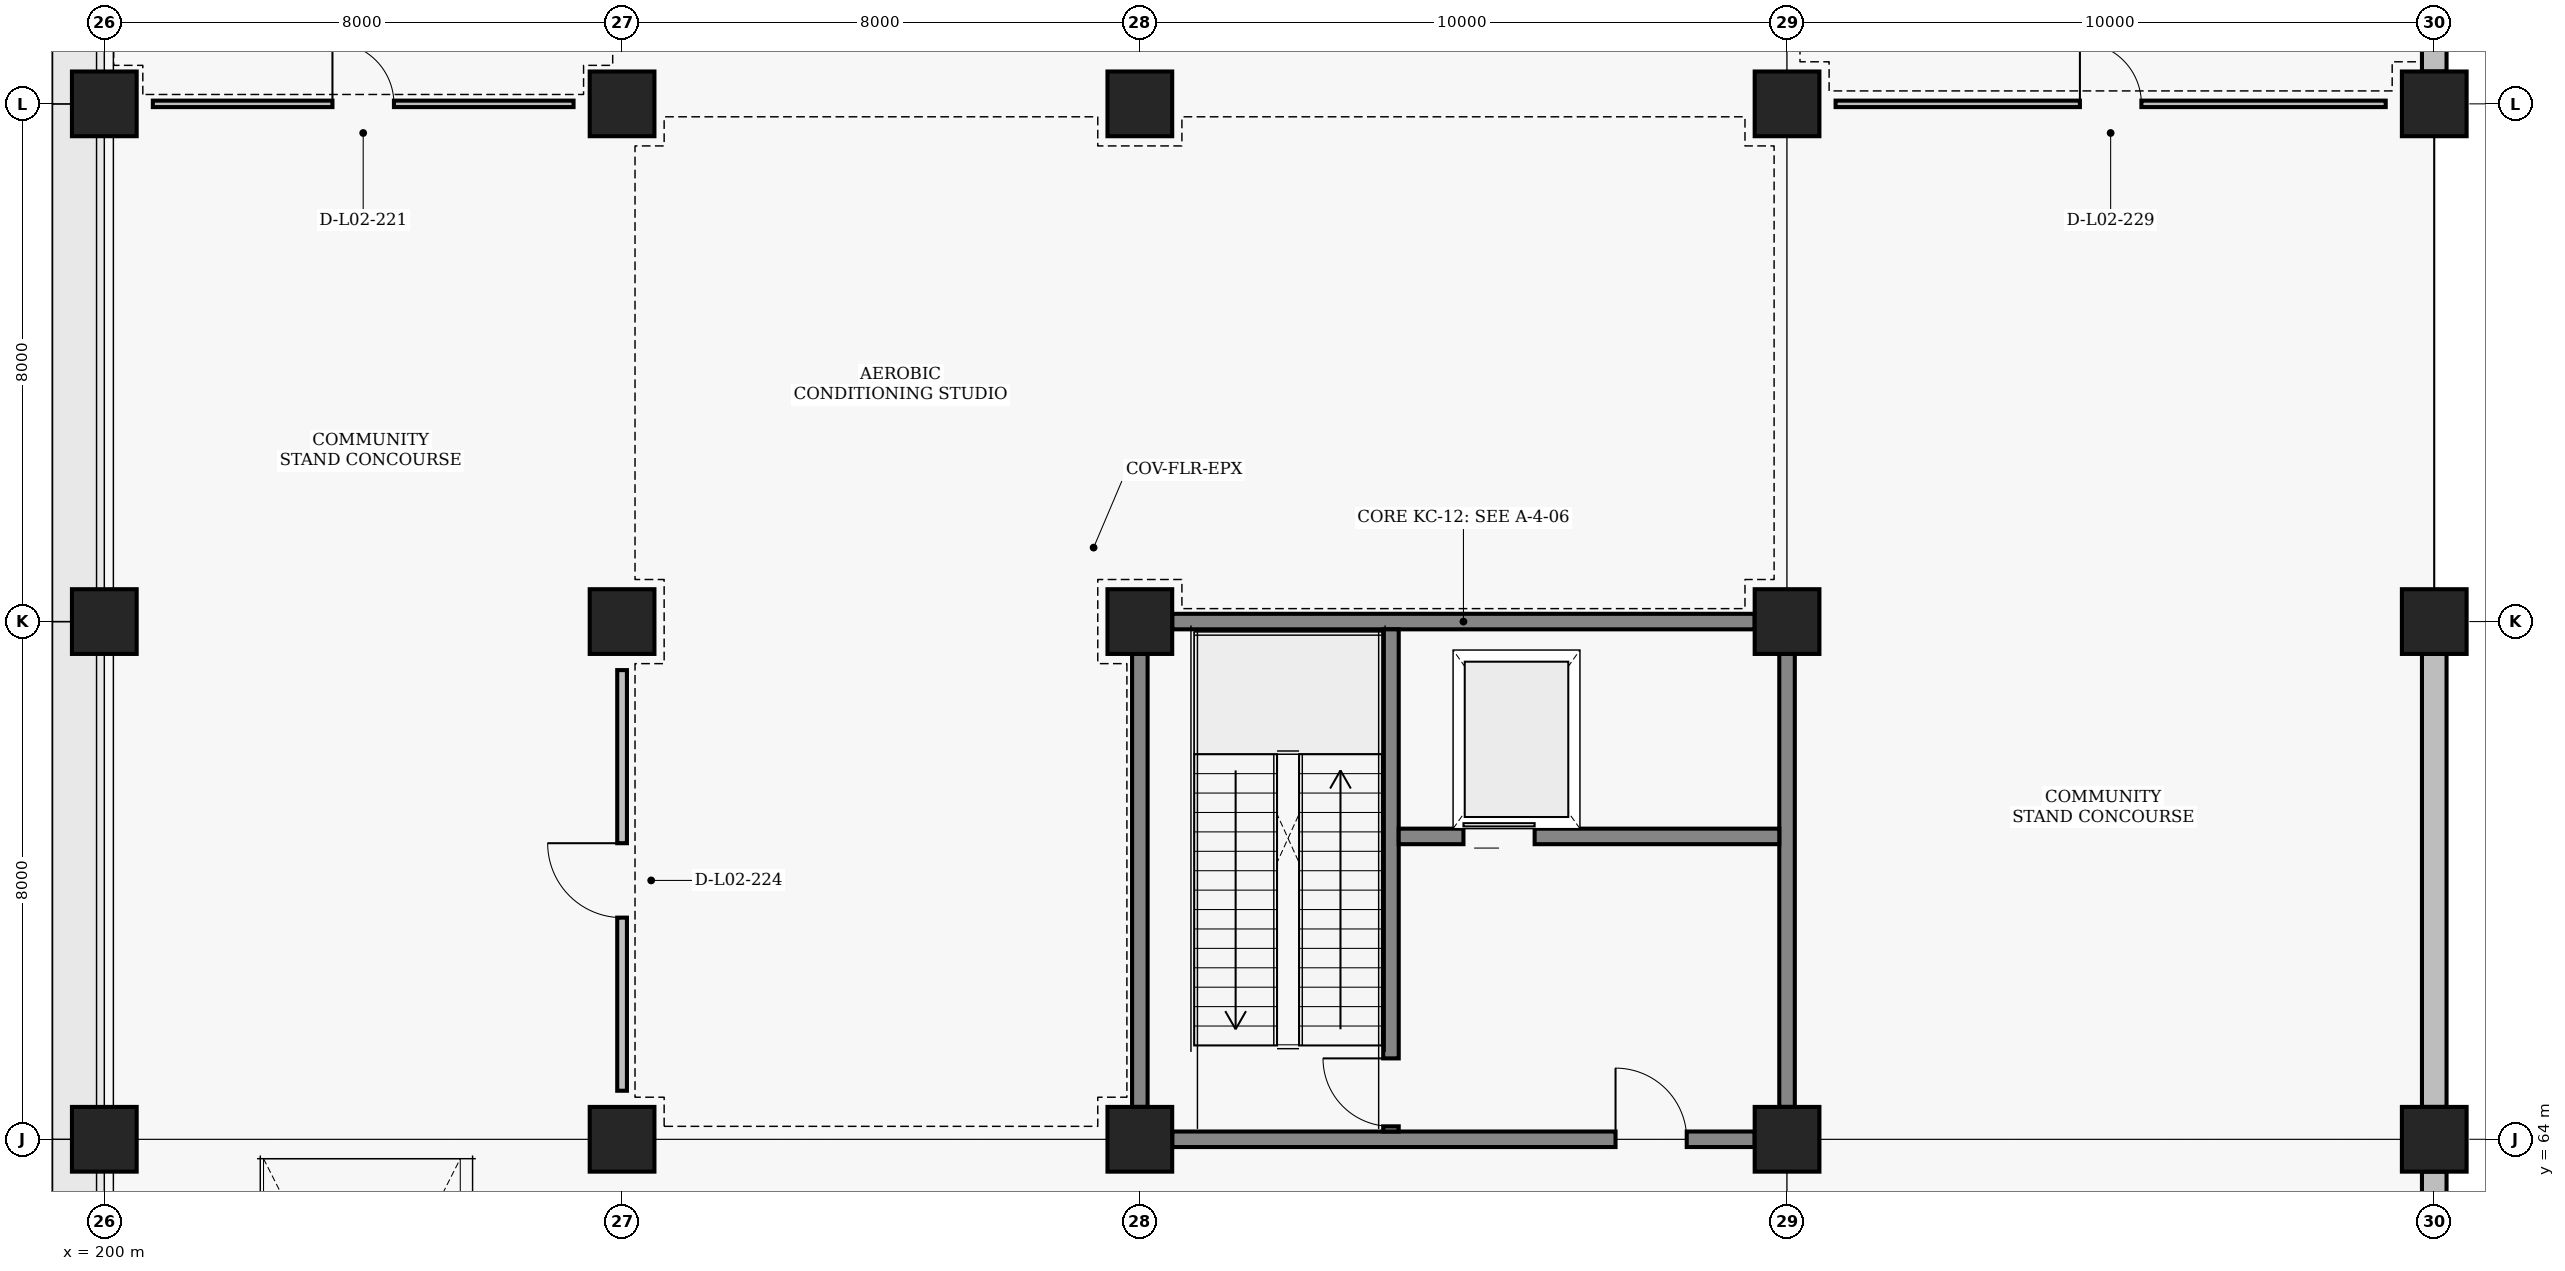
"""IFC4 building model, lengths in metres.
Left out: names, types, materials, properties, quantities, classifications, styles, units other than length and angle.
Written with IfcOpenShell. Run it as: python <this file> out.ifc"""

import sys

from ifc_helpers import new_model, si_unit, direction, frame, frame_2d, origin, origin_2d, place, context, subcontext, project, spatial, rectangle, extrude, element, fill, save


model = new_model("IFC4")
c1 = context("Model", 3, precision=1e-05, world=origin(), true_north=direction((0.0, 1.0)))
c2 = subcontext(c1, "Body", "Model", "MODEL_VIEW")
j1 = project(units=[si_unit("LENGTHUNIT", "METRE"), si_unit("PLANEANGLEUNIT", "RADIAN")], contexts=[c1])
p1 = place(None, origin())
s1 = spatial("IfcSite", under=j1, at=p1, CompositionType="ELEMENT")
p2 = place(p1, origin())
s2 = spatial("IfcBuilding", under=s1, at=p2, CompositionType="ELEMENT")
p3 = place(p2, frame((0.0, 0.0, 4.8)))
s3 = spatial("IfcBuildingStorey", under=s2, at=p3, CompositionType="ELEMENT", Elevation=4.8)
for number, where, z_axis, x_axis in (
    (1, (200.0, 64.0, 0.0), (0.0, 0.0, 1.0), (1.0, 0.0, 0.0)),
    (2, (200.0, 72.0, 0.0), (0.0, 0.0, 1.0), (1.0, 0.0, 0.0)),
    (3, (200.0, 80.0, 0.0), (0.0, 0.0, 1.0), (1.0, 0.0, 0.0)),
    (4, (208.0, 64.0, 0.0), (0.0, 0.0, 1.0), (1.0, 0.0, 0.0)),
    (5, (208.0, 72.0, 0.0), (0.0, 0.0, 1.0), (1.0, 0.0, 0.0)),
    (6, (208.0, 80.0, 0.0), (0.0, 0.0, 1.0), (1.0, 0.0, 0.0)),
    (7, (216.0, 64.0, 0.0), (0.0, 0.0, 1.0), (1.0, 0.0, 0.0)),
    (8, (216.0, 72.0, 0.0), (0.0, 0.0, 1.0), (1.0, 0.0, 0.0)),
    (9, (216.0, 80.0, 0.0), (0.0, 0.0, 1.0), (1.0, 0.0, 0.0)),
    (10, (226.0, 64.0, 0.0), (0.0, 0.0, 1.0), (1.0, 0.0, 0.0)),
    (11, (226.0, 72.0, 0.0), (0.0, 0.0, 1.0), (1.0, 0.0, 0.0)),
    (12, (226.0, 80.0, 0.0), (0.0, 0.0, 1.0), (1.0, 0.0, 0.0)),
    (13, (236.0, 64.0, 0.0), (0.0, 0.0, 1.0), (1.0, 0.0, 0.0)),
    (14, (236.0, 72.0, 0.0), (0.0, 0.0, 1.0), (1.0, 0.0, 0.0)),
    (15, (236.0, 80.0, 0.0), (0.0, 0.0, 1.0), (1.0, 0.0, 0.0)),
):
    element("IfcColumn", number, at=place(p3, frame(where, z_axis=z_axis, x_axis=x_axis)), inside=s3, PredefinedType="COLUMN", context=c2, shape_type="SweptSolid", body=[
        extrude(rectangle(XDim=1.0, YDim=1.0, at=origin_2d()), origin(), (0.0, 0.0, 1.0), 4.8),
    ])
for number, where, z_axis, x_axis in (
    (16, (236.0, 56.5, 0.0), (0.0, 0.0, 1.0), (0.0, 1.0, 0.0)),
    (17, (236.0, 64.5, 0.0), (0.0, 0.0, 1.0), (0.0, 1.0, 0.0)),
    (18, (236.0, 80.5, 0.0), (0.0, 0.0, 1.0), (0.0, 1.0, 0.0)),
):
    element("IfcWall", number, at=place(p3, frame(where, z_axis=z_axis, x_axis=x_axis)), inside=s3, PredefinedType="SOLIDWALL", context=c2, shape_type="SweptSolid", body=[
        extrude(rectangle(XDim=7.0, YDim=0.38, at=frame_2d((3.5, 0.0))), origin(), (0.0, 0.0, 1.0), 3.81),
    ])
p4 = place(p3, frame((216.5, 64.0, 0.0), z_axis=(0.0, 0.0, 1.0), x_axis=(1.0, 0.0, 0.0)))
e19 = element("IfcWall", 19, at=p4, inside=s3, PredefinedType="SHEAR", context=c2, shape_type="SweptSolid", body=[
    extrude(rectangle(XDim=9.0, YDim=0.24, at=frame_2d((4.5, 0.0))), origin(), (0.0, 0.0, 1.0), 3.81),
])
p5 = place(p4, frame((6.85, 0.0, 0.0)))
e20 = element("IfcOpeningElement", 20, at=p5, cuts=e19, PredefinedType="OPENING", context=c2, shape_type="SweptSolid", body=[
    extrude(rectangle(XDim=1.1, YDim=2.2, at=frame_2d((0.55, 1.1))), frame((0.0, 0.13, 0.0), z_axis=(0.0, -1.0, 0.0), x_axis=(1.0, 0.0, 0.0)), (0.0, 0.0, 1.0), 0.26),
])
p6 = place(p3, frame((216.5, 72.0, 0.0), z_axis=(0.0, 0.0, 1.0), x_axis=(1.0, 0.0, 0.0)))
e21 = element("IfcWall", 21, at=p6, inside=s3, PredefinedType="SHEAR", context=c2, shape_type="SweptSolid", body=[
    extrude(rectangle(XDim=9.0, YDim=0.24, at=frame_2d((4.5, 0.0))), origin(), (0.0, 0.0, 1.0), 3.81),
])
p7 = place(p3, frame((216.0, 64.5, 0.0), z_axis=(0.0, 0.0, 1.0), x_axis=(0.0, 1.0, 0.0)))
e22 = element("IfcWall", 22, at=p7, inside=s3, PredefinedType="SHEAR", context=c2, shape_type="SweptSolid", body=[
    extrude(rectangle(XDim=7.0, YDim=0.24, at=frame_2d((3.5, 0.0))), origin(), (0.0, 0.0, 1.0), 3.91),
])
p8 = place(p3, frame((226.0, 64.5, 0.0), z_axis=(0.0, 0.0, 1.0), x_axis=(0.0, 1.0, 0.0)))
e23 = element("IfcWall", 23, at=p8, inside=s3, PredefinedType="SHEAR", context=c2, shape_type="SweptSolid", body=[
    extrude(rectangle(XDim=7.0, YDim=0.24, at=frame_2d((3.5, 0.0))), origin(), (0.0, 0.0, 1.0), 3.81),
])
p9 = place(p3, frame((219.88, 64.12, 0.0), z_axis=(0.0, 0.0, 1.0), x_axis=(0.0, 1.0, 0.0)))
e24 = element("IfcWall", 24, at=p9, inside=s3, PredefinedType="SHEAR", context=c2, shape_type="SweptSolid", body=[
    extrude(rectangle(XDim=7.76, YDim=0.24, at=frame_2d((3.88, 0.0))), origin(), (0.0, 0.0, 1.0), 4.01),
])
p10 = place(p9, frame((0.08, 0.0, 0.0)))
e25 = element("IfcOpeningElement", 25, at=p10, cuts=e24, PredefinedType="OPENING", context=c2, shape_type="SweptSolid", body=[
    extrude(rectangle(XDim=1.05, YDim=2.15, at=frame_2d((0.525, 1.075))), frame((0.0, 0.13, 0.0), z_axis=(0.0, -1.0, 0.0), x_axis=(1.0, 0.0, 0.0)), (0.0, 0.0, 1.0), 0.26),
])
p11 = place(p3, frame((220.0, 68.68, 0.0), z_axis=(0.0, 0.0, 1.0), x_axis=(1.0, 0.0, 0.0)))
e26 = element("IfcWall", 26, at=p11, inside=s3, PredefinedType="SHEAR", context=c2, shape_type="SweptSolid", body=[
    extrude(rectangle(XDim=5.88, YDim=0.24, at=frame_2d((2.94, 0.0))), origin(), (0.0, 0.0, 1.0), 3.91),
])
p12 = place(p11, frame((1.0, 0.0, 0.0)))
e27 = element("IfcOpeningElement", 27, at=p12, cuts=e26, PredefinedType="OPENING", context=c2, shape_type="SweptSolid", body=[
    extrude(rectangle(XDim=1.1, YDim=2.15, at=frame_2d((0.55, 1.075))), frame((0.0, 0.13, 0.0), z_axis=(0.0, -1.0, 0.0), x_axis=(1.0, 0.0, 0.0)), (0.0, 0.0, 1.0), 0.26),
])
p13 = place(p3, frame((200.75, 80.0, 0.0), z_axis=(0.0, 0.0, 1.0), x_axis=(1.0, 0.0, 0.0)))
e28 = element("IfcWall", 28, at=p13, inside=s3, PredefinedType="PARTITIONING", context=c2, shape_type="SweptSolid", body=[
    extrude(rectangle(XDim=6.5, YDim=0.1, at=frame_2d((3.25, 0.0))), origin(), (0.0, 0.0, 1.0), 3.91),
])
p14 = place(p13, frame((2.775, 0.0, 0.0)))
e29 = element("IfcOpeningElement", 29, at=p14, cuts=e28, PredefinedType="OPENING", context=c2, shape_type="SweptSolid", body=[
    extrude(rectangle(XDim=0.95, YDim=2.1, at=frame_2d((0.475, 1.05))), frame((0.0, 0.06, 0.0), z_axis=(0.0, -1.0, 0.0), x_axis=(1.0, 0.0, 0.0)), (0.0, 0.0, 1.0), 0.12),
])
p15 = place(p3, frame((208.0, 64.75, 0.0), z_axis=(0.0, 0.0, 1.0), x_axis=(0.0, 1.0, 0.0)))
e30 = element("IfcWall", 30, at=p15, inside=s3, PredefinedType="PARTITIONING", context=c2, shape_type="SweptSolid", body=[
    extrude(rectangle(XDim=6.5, YDim=0.15, at=frame_2d((3.25, 0.0))), origin(), (0.0, 0.0, 1.0), 3.91),
])
p16 = place(p15, frame((2.675, 0.0, 0.0)))
e31 = element("IfcOpeningElement", 31, at=p16, cuts=e30, PredefinedType="OPENING", context=c2, shape_type="SweptSolid", body=[
    extrude(rectangle(XDim=1.15, YDim=2.15, at=frame_2d((0.575, 1.075))), frame((0.0, 0.085, 0.0), z_axis=(0.0, -1.0, 0.0), x_axis=(1.0, 0.0, 0.0)), (0.0, 0.0, 1.0), 0.17),
])
p17 = place(p3, frame((226.75, 80.0, 0.0), z_axis=(0.0, 0.0, 1.0), x_axis=(1.0, 0.0, 0.0)))
e32 = element("IfcWall", 32, at=p17, inside=s3, PredefinedType="PARTITIONING", context=c2, shape_type="SweptSolid", body=[
    extrude(rectangle(XDim=8.5, YDim=0.1, at=frame_2d((4.25, 0.0))), origin(), (0.0, 0.0, 1.0), 3.81),
])
p18 = place(p17, frame((3.775, 0.0, 0.0)))
e33 = element("IfcOpeningElement", 33, at=p18, cuts=e32, PredefinedType="OPENING", context=c2, shape_type="SweptSolid", body=[
    extrude(rectangle(XDim=0.95, YDim=2.1, at=frame_2d((0.475, 1.05))), frame((0.0, 0.06, 0.0), z_axis=(0.0, -1.0, 0.0), x_axis=(1.0, 0.0, 0.0)), (0.0, 0.0, 1.0), 0.12),
])
p19 = place(p5, origin())
e34 = element("IfcDoor", 34, at=p19, inside=s3, OperationType="SINGLE_SWING_LEFT", PredefinedType="DOOR", context=c2, shape_type="SweptSolid", body=[
    extrude(rectangle(XDim=1.1, YDim=2.2, at=frame_2d((0.55, 1.1))), frame((0.0, 0.025, 0.0), z_axis=(0.0, -1.0, 0.0), x_axis=(1.0, 0.0, 0.0)), (0.0, 0.0, 1.0), 0.05),
])
fill(e20, e34)
p20 = place(p10, origin())
e35 = element("IfcDoor", 35, at=p20, inside=s3, OperationType="SINGLE_SWING_RIGHT", PredefinedType="DOOR", context=c2, shape_type="SweptSolid", body=[
    extrude(rectangle(XDim=1.05, YDim=2.15, at=frame_2d((0.525, 1.075))), frame((0.0, 0.025, 0.0), z_axis=(0.0, -1.0, 0.0), x_axis=(1.0, 0.0, 0.0)), (0.0, 0.0, 1.0), 0.05),
])
fill(e25, e35)
p21 = place(p12, origin())
e36 = element("IfcDoor", 36, at=p21, inside=s3, OperationType="SLIDING_TO_LEFT", PredefinedType="DOOR", context=c2, shape_type="SweptSolid", body=[
    extrude(rectangle(XDim=1.1, YDim=2.15, at=frame_2d((0.55, 1.075))), frame((0.0, 0.025, 0.0), z_axis=(0.0, -1.0, 0.0), x_axis=(1.0, 0.0, 0.0)), (0.0, 0.0, 1.0), 0.05),
])
fill(e27, e36)
p22 = place(p14, origin())
e37 = element("IfcDoor", 37, at=p22, inside=s3, OperationType="SINGLE_SWING_LEFT", PredefinedType="DOOR", context=c2, shape_type="SweptSolid", body=[
    extrude(rectangle(XDim=0.95, YDim=2.1, at=frame_2d((0.475, 1.05))), frame((0.0, 0.025, 0.0), z_axis=(0.0, -1.0, 0.0), x_axis=(1.0, 0.0, 0.0)), (0.0, 0.0, 1.0), 0.05),
])
fill(e29, e37)
p23 = place(p16, origin())
e38 = element("IfcDoor", 38, at=p23, inside=s3, OperationType="SINGLE_SWING_RIGHT", PredefinedType="DOOR", context=c2, shape_type="SweptSolid", body=[
    extrude(rectangle(XDim=1.15, YDim=2.15, at=frame_2d((0.575, 1.075))), frame((0.0, 0.025, 0.0), z_axis=(0.0, -1.0, 0.0), x_axis=(1.0, 0.0, 0.0)), (0.0, 0.0, 1.0), 0.05),
])
fill(e31, e38)
p24 = place(p18, origin())
e39 = element("IfcDoor", 39, at=p24, inside=s3, OperationType="SINGLE_SWING_LEFT", PredefinedType="DOOR", context=c2, shape_type="SweptSolid", body=[
    extrude(rectangle(XDim=0.95, YDim=2.1, at=frame_2d((0.475, 1.05))), frame((0.0, 0.025, 0.0), z_axis=(0.0, -1.0, 0.0), x_axis=(1.0, 0.0, 0.0)), (0.0, 0.0, 1.0), 0.05),
])
fill(e33, e39)
save(model, sys.argv[1])
